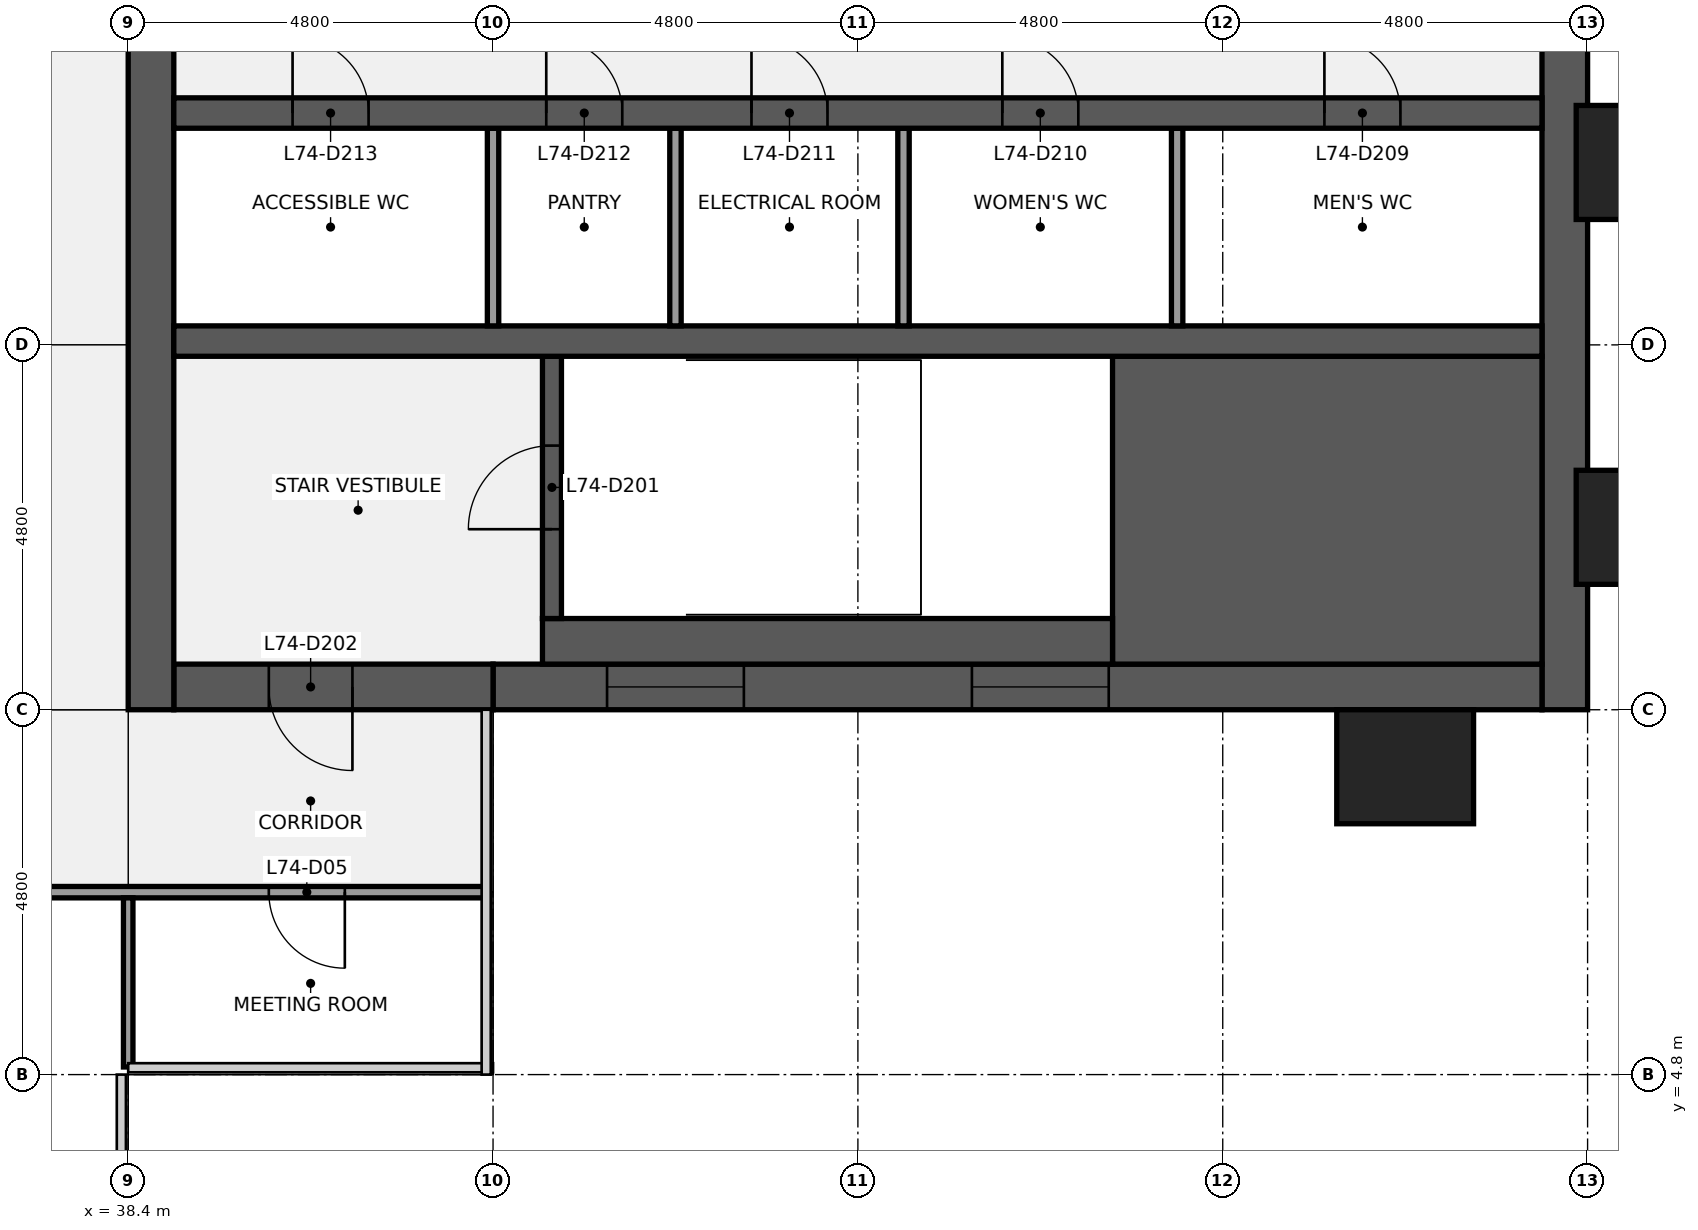
"""IFC4 building model, lengths in metres.
Left out: names, types, materials, properties, quantities, classifications, styles, units other than length and angle.
Written with IfcOpenShell. Run it as: python <this file> out.ifc"""

import sys

from ifc_helpers import new_model, si_unit, direction, frame, frame_2d, origin, origin_2d, place, context, subcontext, project, spatial, rectangle, extrude, element, fill, save


model = new_model("IFC4")
c1 = context("Model", 3, precision=1e-05, world=origin(), true_north=direction((0.0, 1.0)))
c2 = subcontext(c1, "Body", "Model", "MODEL_VIEW")
j1 = project(units=[si_unit("LENGTHUNIT", "METRE"), si_unit("PLANEANGLEUNIT", "RADIAN")], contexts=[c1])
p1 = place(None, origin())
s1 = spatial("IfcSite", under=j1, at=p1, CompositionType="ELEMENT")
p2 = place(p1, origin())
s2 = spatial("IfcBuilding", under=s1, at=p2, CompositionType="ELEMENT")
p3 = place(p2, frame((0.0, 0.0, 334.3)))
s3 = spatial("IfcBuildingStorey", under=s2, at=p3, CompositionType="ELEMENT", Elevation=334.3)
p4 = place(p3, frame((57.3, 38.4, 0.0), z_axis=(0.0, 0.0, 1.0), x_axis=(0.0, -1.0, 0.0)))
e1 = element("IfcWall", 1, at=p4, inside=s3, PredefinedType="SHEAR", context=c2, shape_type="SweptSolid", body=[
    extrude(rectangle(XDim=28.8, YDim=0.6, at=frame_2d((14.4, 0.0))), origin(), (0.0, 0.0, 1.0), 3.84),
])
p5 = place(p4, frame((18.45, 0.0, 0.9)))
e2 = element("IfcOpeningElement", 2, at=p5, cuts=e1, PredefinedType="OPENING", context=c2, shape_type="SweptSolid", body=[
    extrude(rectangle(XDim=1.5, YDim=1.5, at=frame_2d((0.75, 0.75))), frame((0.0, 0.31, 0.0), z_axis=(0.0, -1.0, 0.0), x_axis=(1.0, 0.0, 0.0)), (0.0, 0.0, 1.0), 0.62),
])
p6 = place(p4, frame((8.85, 0.0, 0.9)))
e3 = element("IfcOpeningElement", 3, at=p6, cuts=e1, PredefinedType="OPENING", context=c2, shape_type="SweptSolid", body=[
    extrude(rectangle(XDim=1.5, YDim=1.5, at=frame_2d((0.75, 0.75))), frame((0.0, 0.31, 0.0), z_axis=(0.0, -1.0, 0.0), x_axis=(1.0, 0.0, 0.0)), (0.0, 0.0, 1.0), 0.62),
])
p7 = place(p3, frame((57.0, 9.9, 0.0), z_axis=(0.0, 0.0, 1.0), x_axis=(-1.0, 0.0, 0.0)))
e4 = element("IfcWall", 4, at=p7, inside=s3, PredefinedType="SHEAR", context=c2, shape_type="SweptSolid", body=[
    extrude(rectangle(XDim=13.8, YDim=0.6, at=frame_2d((6.9, 0.0))), origin(), (0.0, 0.0, 1.0), 3.84),
])
p8 = place(p7, frame((5.7, 0.0, 0.9)))
e5 = element("IfcOpeningElement", 5, at=p8, cuts=e4, PredefinedType="OPENING", context=c2, shape_type="SweptSolid", body=[
    extrude(rectangle(XDim=1.8, YDim=1.5, at=frame_2d((0.9, 0.75))), frame((0.0, 0.31, 0.0), z_axis=(0.0, -1.0, 0.0), x_axis=(1.0, 0.0, 0.0)), (0.0, 0.0, 1.0), 0.62),
])
p9 = place(p7, frame((10.5, 0.0, 0.9)))
e6 = element("IfcOpeningElement", 6, at=p9, cuts=e4, PredefinedType="OPENING", context=c2, shape_type="SweptSolid", body=[
    extrude(rectangle(XDim=1.8, YDim=1.5, at=frame_2d((0.9, 0.75))), frame((0.0, 0.31, 0.0), z_axis=(0.0, -1.0, 0.0), x_axis=(1.0, 0.0, 0.0)), (0.0, 0.0, 1.0), 0.62),
])
p10 = place(p3, frame((43.2, 9.9, 0.0), z_axis=(0.0, 0.0, 1.0), x_axis=(-1.0, 0.0, 0.0)))
e7 = element("IfcWall", 7, at=p10, inside=s3, PredefinedType="SHEAR", context=c2, shape_type="SweptSolid", body=[
    extrude(rectangle(XDim=4.2, YDim=0.6, at=frame_2d((2.1, 0.0))), origin(), (0.0, 0.0, 1.0), 3.84),
])
p11 = place(p10, frame((1.85, 0.0, 0.0)))
e8 = element("IfcOpeningElement", 8, at=p11, cuts=e7, PredefinedType="OPENING", context=c2, shape_type="SweptSolid", body=[
    extrude(rectangle(XDim=1.1, YDim=2.1, at=frame_2d((0.55, 1.05))), frame((0.0, 0.31, 0.0), z_axis=(0.0, -1.0, 0.0), x_axis=(1.0, 0.0, 0.0)), (0.0, 0.0, 1.0), 0.62),
])
p12 = place(p3, frame((38.7, 9.6, 0.0), z_axis=(0.0, 0.0, 1.0), x_axis=(0.0, 1.0, 0.0)))
e9 = element("IfcWall", 9, at=p12, inside=s3, PredefinedType="SHEAR", context=c2, shape_type="SweptSolid", body=[
    extrude(rectangle(XDim=28.8, YDim=0.6, at=frame_2d((14.4, 0.0))), origin(), (0.0, 0.0, 1.0), 3.84),
])
p13 = place(p12, frame((8.7, 0.0, 0.0)))
e10 = element("IfcOpeningElement", 10, at=p13, cuts=e9, PredefinedType="OPENING", context=c2, shape_type="SweptSolid", body=[
    extrude(rectangle(XDim=1.8, YDim=2.1, at=frame_2d((0.9, 1.05))), frame((0.0, 0.31, 0.0), z_axis=(0.0, -1.0, 0.0), x_axis=(1.0, 0.0, 0.0)), (0.0, 0.0, 1.0), 0.62),
])
p14 = place(p12, frame((18.3, 0.0, 0.0)))
e11 = element("IfcOpeningElement", 11, at=p14, cuts=e9, PredefinedType="OPENING", context=c2, shape_type="SweptSolid", body=[
    extrude(rectangle(XDim=1.8, YDim=2.1, at=frame_2d((0.9, 1.05))), frame((0.0, 0.31, 0.0), z_axis=(0.0, -1.0, 0.0), x_axis=(1.0, 0.0, 0.0)), (0.0, 0.0, 1.0), 0.62),
])
p15 = place(p3, frame((51.35, 12.225, 0.0), z_axis=(0.0, 0.0, 1.0), x_axis=(1.0, 0.0, 0.0)))
e12 = element("IfcWall", 12, at=p15, inside=s3, PredefinedType="SHEAR", context=c2, shape_type="SweptSolid", body=[
    extrude(rectangle(XDim=5.65, YDim=4.05, at=frame_2d((2.825, 0.0))), origin(), (0.0, 0.0, 1.0), 3.84),
])
p16 = place(p3, frame((43.85, 10.5, 0.0), z_axis=(0.0, 0.0, 1.0), x_axis=(1.0, 0.0, 0.0)))
e13 = element("IfcWall", 13, at=p16, inside=s3, PredefinedType="SHEAR", context=c2, shape_type="SweptSolid", body=[
    extrude(rectangle(XDim=7.5, YDim=0.6, at=frame_2d((3.75, 0.0))), origin(), (0.0, 0.0, 1.0), 3.84),
])
p17 = place(p3, frame((43.975, 10.8, 0.0), z_axis=(0.0, 0.0, 1.0), x_axis=(0.0, 1.0, 0.0)))
e14 = element("IfcWall", 14, at=p17, inside=s3, PredefinedType="SHEAR", context=c2, shape_type="SweptSolid", body=[
    extrude(rectangle(XDim=3.45, YDim=0.25, at=frame_2d((1.725, 0.0))), origin(), (0.0, 0.0, 1.0), 3.84),
])
p18 = place(p17, frame((1.175, 0.0, 0.0)))
e15 = element("IfcOpeningElement", 15, at=p18, cuts=e14, PredefinedType="OPENING", context=c2, shape_type="SweptSolid", body=[
    extrude(rectangle(XDim=1.1, YDim=2.1, at=frame_2d((0.55, 1.05))), frame((0.0, 0.135, 0.0), z_axis=(0.0, -1.0, 0.0), x_axis=(1.0, 0.0, 0.0)), (0.0, 0.0, 1.0), 0.27),
])
p19 = place(p3, frame((39.0, 14.45, 0.0), z_axis=(0.0, 0.0, 1.0), x_axis=(1.0, 0.0, 0.0)))
e16 = element("IfcWall", 16, at=p19, inside=s3, PredefinedType="SHEAR", context=c2, shape_type="SweptSolid", body=[
    extrude(rectangle(XDim=18.0, YDim=0.4, at=frame_2d((9.0, 0.0))), origin(), (0.0, 0.0, 1.0), 3.84),
])
for number, where, z_axis, x_axis in (
    (17, (52.2, 14.65, 0.0), (0.0, 0.0, 1.0), (0.0, 1.0, 0.0)),
    (18, (48.6, 14.65, 0.0), (0.0, 0.0, 1.0), (0.0, 1.0, 0.0)),
    (19, (45.6, 14.65, 0.0), (0.0, 0.0, 1.0), (0.0, 1.0, 0.0)),
    (20, (43.2, 14.65, 0.0), (0.0, 0.0, 1.0), (0.0, 1.0, 0.0)),
):
    element("IfcWall", number, at=place(p3, frame(where, z_axis=z_axis, x_axis=x_axis)), inside=s3, PredefinedType="PARTITIONING", context=c2, shape_type="SweptSolid", body=[
        extrude(rectangle(XDim=2.6, YDim=0.15, at=frame_2d((1.3, 0.0))), origin(), (0.0, 0.0, 1.0), 3.84),
    ])
p20 = place(p3, frame((39.0, 17.45, 0.0), z_axis=(0.0, 0.0, 1.0), x_axis=(1.0, 0.0, 0.0)))
e21 = element("IfcWall", 21, at=p20, inside=s3, PredefinedType="SHEAR", context=c2, shape_type="SweptSolid", body=[
    extrude(rectangle(XDim=18.0, YDim=0.4, at=frame_2d((9.0, 0.0))), origin(), (0.0, 0.0, 1.0), 3.84),
])
p21 = place(p20, frame((15.137, 0.0, 0.0)))
e22 = element("IfcOpeningElement", 22, at=p21, cuts=e21, PredefinedType="OPENING", context=c2, shape_type="SweptSolid", body=[
    extrude(rectangle(XDim=1.0, YDim=2.1, at=frame_2d((0.5, 1.05))), frame((0.0, 0.21, 0.0), z_axis=(0.0, -1.0, 0.0), x_axis=(1.0, 0.0, 0.0)), (0.0, 0.0, 1.0), 0.42),
])
p22 = place(p20, frame((10.9, 0.0, 0.0)))
e23 = element("IfcOpeningElement", 23, at=p22, cuts=e21, PredefinedType="OPENING", context=c2, shape_type="SweptSolid", body=[
    extrude(rectangle(XDim=1.0, YDim=2.1, at=frame_2d((0.5, 1.05))), frame((0.0, 0.21, 0.0), z_axis=(0.0, -1.0, 0.0), x_axis=(1.0, 0.0, 0.0)), (0.0, 0.0, 1.0), 0.42),
])
p23 = place(p20, frame((7.6, 0.0, 0.0)))
e24 = element("IfcOpeningElement", 24, at=p23, cuts=e21, PredefinedType="OPENING", context=c2, shape_type="SweptSolid", body=[
    extrude(rectangle(XDim=1.0, YDim=2.1, at=frame_2d((0.5, 1.05))), frame((0.0, 0.21, 0.0), z_axis=(0.0, -1.0, 0.0), x_axis=(1.0, 0.0, 0.0)), (0.0, 0.0, 1.0), 0.42),
])
p24 = place(p20, frame((4.9, 0.0, 0.0)))
e25 = element("IfcOpeningElement", 25, at=p24, cuts=e21, PredefinedType="OPENING", context=c2, shape_type="SweptSolid", body=[
    extrude(rectangle(XDim=1.0, YDim=2.1, at=frame_2d((0.5, 1.05))), frame((0.0, 0.21, 0.0), z_axis=(0.0, -1.0, 0.0), x_axis=(1.0, 0.0, 0.0)), (0.0, 0.0, 1.0), 0.42),
])
p25 = place(p20, frame((1.562, 0.0, 0.0)))
e26 = element("IfcOpeningElement", 26, at=p25, cuts=e21, PredefinedType="OPENING", context=c2, shape_type="SweptSolid", body=[
    extrude(rectangle(XDim=1.0, YDim=2.1, at=frame_2d((0.5, 1.05))), frame((0.0, 0.21, 0.0), z_axis=(0.0, -1.0, 0.0), x_axis=(1.0, 0.0, 0.0)), (0.0, 0.0, 1.0), 0.42),
])
p26 = place(p3, frame((14.5, 7.2, 0.0), z_axis=(0.0, 0.0, 1.0), x_axis=(1.0, 0.0, 0.0)))
e27 = element("IfcWall", 27, at=p26, inside=s3, PredefinedType="PARTITIONING", context=c2, shape_type="SweptSolid", body=[
    extrude(rectangle(XDim=28.6, YDim=0.15, at=frame_2d((14.3, 0.0))), origin(), (0.0, 0.0, 1.0), 2.849),
])
p27 = place(p26, frame((1.85, 0.0, 0.0)))
e28 = element("IfcOpeningElement", 28, at=p27, cuts=e27, PredefinedType="OPENING", context=c2, shape_type="SweptSolid", body=[
    extrude(rectangle(XDim=1.0, YDim=2.1, at=frame_2d((0.5, 1.05))), frame((0.0, 0.085, 0.0), z_axis=(0.0, -1.0, 0.0), x_axis=(1.0, 0.0, 0.0)), (0.0, 0.0, 1.0), 0.17),
])
p28 = place(p26, frame((6.6, 0.0, 0.0)))
e29 = element("IfcOpeningElement", 29, at=p28, cuts=e27, PredefinedType="OPENING", context=c2, shape_type="SweptSolid", body=[
    extrude(rectangle(XDim=1.0, YDim=2.1, at=frame_2d((0.5, 1.05))), frame((0.0, 0.085, 0.0), z_axis=(0.0, -1.0, 0.0), x_axis=(1.0, 0.0, 0.0)), (0.0, 0.0, 1.0), 0.17),
])
p29 = place(p26, frame((13.8, 0.0, 0.0)))
e30 = element("IfcOpeningElement", 30, at=p29, cuts=e27, PredefinedType="OPENING", context=c2, shape_type="SweptSolid", body=[
    extrude(rectangle(XDim=1.0, YDim=2.1, at=frame_2d((0.5, 1.05))), frame((0.0, 0.085, 0.0), z_axis=(0.0, -1.0, 0.0), x_axis=(1.0, 0.0, 0.0)), (0.0, 0.0, 1.0), 0.17),
])
p30 = place(p26, frame((21.0, 0.0, 0.0)))
e31 = element("IfcOpeningElement", 31, at=p30, cuts=e27, PredefinedType="OPENING", context=c2, shape_type="SweptSolid", body=[
    extrude(rectangle(XDim=1.0, YDim=2.1, at=frame_2d((0.5, 1.05))), frame((0.0, 0.085, 0.0), z_axis=(0.0, -1.0, 0.0), x_axis=(1.0, 0.0, 0.0)), (0.0, 0.0, 1.0), 0.17),
])
p31 = place(p26, frame((25.75, 0.0, 0.0)))
e32 = element("IfcOpeningElement", 32, at=p31, cuts=e27, PredefinedType="OPENING", context=c2, shape_type="SweptSolid", body=[
    extrude(rectangle(XDim=1.0, YDim=2.1, at=frame_2d((0.5, 1.05))), frame((0.0, 0.085, 0.0), z_axis=(0.0, -1.0, 0.0), x_axis=(1.0, 0.0, 0.0)), (0.0, 0.0, 1.0), 0.17),
])
p32 = place(p3, frame((38.4, 4.9, 0.0), z_axis=(0.0, 0.0, 1.0), x_axis=(0.0, 1.0, 0.0)))
e33 = element("IfcWall", 33, at=p32, inside=s3, PredefinedType="PARTITIONING", context=c2, shape_type="SweptSolid", body=[
    extrude(rectangle(XDim=2.225, YDim=0.125, at=frame_2d((1.113, 0.0))), origin(), (0.0, 0.0, 1.0), 2.849),
])
for number, where, z_axis, x_axis in (
    (34, (55.2, 8.85, 0.0), (0.0, 0.0, 1.0), (1.0, 0.0, 0.0)),
    (35, (58.35, 12.0, 0.0), (0.0, 0.0, 1.0), (0.0, 1.0, 0.0)),
    (36, (58.35, 16.8, 0.0), (0.0, 0.0, 1.0), (0.0, 1.0, 0.0)),
):
    element("IfcColumn", number, at=place(p3, frame(where, z_axis=z_axis, x_axis=x_axis)), inside=s3, PredefinedType="PILASTER", context=c2, shape_type="SweptSolid", body=[
        extrude(rectangle(XDim=1.8, YDim=1.5, at=origin_2d()), origin(), (0.0, 0.0, 1.0), 4.0),
    ])
p33 = place(p18, origin())
e37 = element("IfcDoor", 37, at=p33, inside=s3, OperationType="SINGLE_SWING_LEFT", PredefinedType="DOOR", context=c2, shape_type="SweptSolid", body=[
    extrude(rectangle(XDim=1.1, YDim=2.1, at=frame_2d((0.55, 1.05))), frame((0.0, 0.025, 0.0), z_axis=(0.0, -1.0, 0.0), x_axis=(1.0, 0.0, 0.0)), (0.0, 0.0, 1.0), 0.05),
])
fill(e15, e37)
p34 = place(p11, origin())
e38 = element("IfcDoor", 38, at=p34, inside=s3, OperationType="SINGLE_SWING_LEFT", PredefinedType="DOOR", context=c2, shape_type="SweptSolid", body=[
    extrude(rectangle(XDim=1.1, YDim=2.1, at=frame_2d((0.55, 1.05))), frame((0.0, 0.025, 0.0), z_axis=(0.0, -1.0, 0.0), x_axis=(1.0, 0.0, 0.0)), (0.0, 0.0, 1.0), 0.05),
])
fill(e8, e38)
p35 = place(p21, origin())
e39 = element("IfcDoor", 39, at=p35, inside=s3, OperationType="SINGLE_SWING_LEFT", PredefinedType="DOOR", context=c2, shape_type="SweptSolid", body=[
    extrude(rectangle(XDim=1.0, YDim=2.1, at=frame_2d((0.5, 1.05))), frame((0.0, 0.025, 0.0), z_axis=(0.0, -1.0, 0.0), x_axis=(1.0, 0.0, 0.0)), (0.0, 0.0, 1.0), 0.05),
])
fill(e22, e39)
p36 = place(p22, origin())
e40 = element("IfcDoor", 40, at=p36, inside=s3, OperationType="SINGLE_SWING_LEFT", PredefinedType="DOOR", context=c2, shape_type="SweptSolid", body=[
    extrude(rectangle(XDim=1.0, YDim=2.1, at=frame_2d((0.5, 1.05))), frame((0.0, 0.025, 0.0), z_axis=(0.0, -1.0, 0.0), x_axis=(1.0, 0.0, 0.0)), (0.0, 0.0, 1.0), 0.05),
])
fill(e23, e40)
p37 = place(p23, origin())
e41 = element("IfcDoor", 41, at=p37, inside=s3, OperationType="SINGLE_SWING_LEFT", PredefinedType="DOOR", context=c2, shape_type="SweptSolid", body=[
    extrude(rectangle(XDim=1.0, YDim=2.1, at=frame_2d((0.5, 1.05))), frame((0.0, 0.025, 0.0), z_axis=(0.0, -1.0, 0.0), x_axis=(1.0, 0.0, 0.0)), (0.0, 0.0, 1.0), 0.05),
])
fill(e24, e41)
p38 = place(p24, origin())
e42 = element("IfcDoor", 42, at=p38, inside=s3, OperationType="SINGLE_SWING_LEFT", PredefinedType="DOOR", context=c2, shape_type="SweptSolid", body=[
    extrude(rectangle(XDim=1.0, YDim=2.1, at=frame_2d((0.5, 1.05))), frame((0.0, 0.025, 0.0), z_axis=(0.0, -1.0, 0.0), x_axis=(1.0, 0.0, 0.0)), (0.0, 0.0, 1.0), 0.05),
])
fill(e25, e42)
p39 = place(p25, origin())
e43 = element("IfcDoor", 43, at=p39, inside=s3, OperationType="SINGLE_SWING_LEFT", PredefinedType="DOOR", context=c2, shape_type="SweptSolid", body=[
    extrude(rectangle(XDim=1.0, YDim=2.1, at=frame_2d((0.5, 1.05))), frame((0.0, 0.025, 0.0), z_axis=(0.0, -1.0, 0.0), x_axis=(1.0, 0.0, 0.0)), (0.0, 0.0, 1.0), 0.05),
])
fill(e26, e43)
p40 = place(p8, origin())
e44 = element("IfcWindow", 44, at=p40, inside=s3, PartitioningType="SINGLE_PANEL", PredefinedType="WINDOW", context=c2, shape_type="SweptSolid", body=[
    extrude(rectangle(XDim=1.8, YDim=1.5, at=frame_2d((0.9, 0.75))), frame((0.0, 0.03, 0.0), z_axis=(0.0, -1.0, 0.0), x_axis=(1.0, 0.0, 0.0)), (0.0, 0.0, 1.0), 0.06),
])
fill(e5, e44)
p41 = place(p9, origin())
e45 = element("IfcWindow", 45, at=p41, inside=s3, PartitioningType="SINGLE_PANEL", PredefinedType="WINDOW", context=c2, shape_type="SweptSolid", body=[
    extrude(rectangle(XDim=1.8, YDim=1.5, at=frame_2d((0.9, 0.75))), frame((0.0, 0.03, 0.0), z_axis=(0.0, -1.0, 0.0), x_axis=(1.0, 0.0, 0.0)), (0.0, 0.0, 1.0), 0.06),
])
fill(e6, e45)
p42 = place(p31, origin())
e46 = element("IfcDoor", 46, at=p42, inside=s3, OperationType="SINGLE_SWING_RIGHT", PredefinedType="DOOR", context=c2, shape_type="SweptSolid", body=[
    extrude(rectangle(XDim=1.0, YDim=2.1, at=frame_2d((0.5, 1.05))), frame((0.0, 0.025, 0.0), z_axis=(0.0, -1.0, 0.0), x_axis=(1.0, 0.0, 0.0)), (0.0, 0.0, 1.0), 0.05),
])
fill(e32, e46)
save(model, sys.argv[1])
